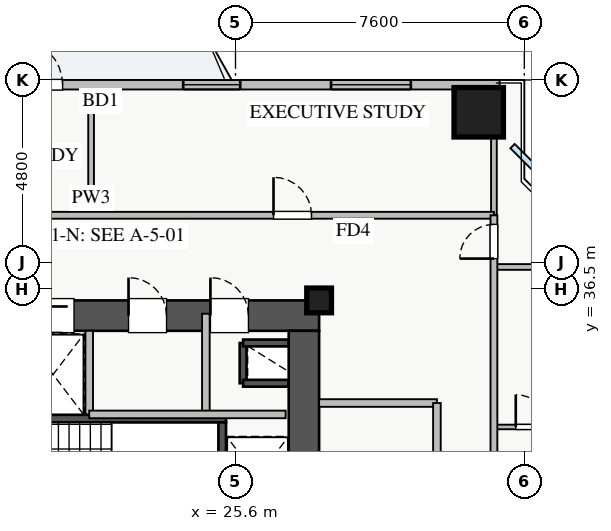
"""IFC4 building model, lengths in metres.
Left out: names, types, materials, properties, quantities, classifications, styles, units other than length and angle.
Written with IfcOpenShell. Run it as: python <this file> out.ifc"""

import sys

from ifc_helpers import new_model, si_unit, direction, frame, frame_2d, origin, origin_2d, place, context, subcontext, project, spatial, rectangle, extrude, source, transform, mapped, element, fill, save


model = new_model("IFC4")
c1 = context("Model", 3, precision=1e-05, world=origin(), true_north=direction((0.0, 1.0)))
c2 = subcontext(c1, "Body", "Model", "MODEL_VIEW")
j1 = project(units=[si_unit("LENGTHUNIT", "METRE"), si_unit("PLANEANGLEUNIT", "RADIAN")], contexts=[c1])
p1 = place(None, origin())
s1 = spatial("IfcSite", under=j1, at=p1, CompositionType="ELEMENT")
p2 = place(p1, origin())
s2 = spatial("IfcBuilding", under=s1, at=p2, CompositionType="ELEMENT")
p3 = place(p2, frame((0.0, 0.0, 56.75)))
s3 = spatial("IfcBuildingStorey", under=s2, at=p3, CompositionType="ELEMENT", Elevation=56.75)
p4 = place(p3, frame((25.8, 34.02, 0.0), z_axis=(0.0, 0.0, 1.0), x_axis=(0.0, 1.0, 0.0)))
e1 = element("IfcWall", 1, at=p4, inside=s3, PredefinedType="SHEAR", context=c2, shape_type="SweptSolid", body=[
    extrude(rectangle(XDim=1.06, YDim=0.18, at=frame_2d((0.53, 0.0))), origin(), (0.0, 0.0, 1.0), 3.07),
])
for number, where, z_axis, x_axis in (
    (2, (25.8, 35.08, 0.0), (0.0, 0.0, 1.0), (1.0, 0.0, 0.0)),
    (3, (25.8, 34.02, 0.0), (0.0, 0.0, 1.0), (1.0, 0.0, 0.0)),
):
    element("IfcWall", number, at=place(p3, frame(where, z_axis=z_axis, x_axis=x_axis)), inside=s3, PredefinedType="SHEAR", context=c2, shape_type="SweptSolid", body=[
        extrude(rectangle(XDim=1.2, YDim=0.18, at=frame_2d((0.6, 0.0))), origin(), (0.0, 0.0, 1.0), 3.07),
    ])
p5 = place(p3, frame((19.88, 33.2, 0.0), z_axis=(0.0, 0.0, 1.0), x_axis=(1.0, 0.0, 0.0)))
e4 = element("IfcWall", 4, at=p5, inside=s3, PredefinedType="SHEAR", context=c2, shape_type="SweptSolid", body=[
    extrude(rectangle(XDim=1.87, YDim=0.18, at=frame_2d((0.935, 0.0))), origin(), (0.0, 0.0, 1.0), 3.07),
])
p6 = place(p3, frame((18.2, 33.09, 0.0), z_axis=(0.0, 0.0, 1.0), x_axis=(1.0, 0.0, 0.0)))
e5 = element("IfcWall", 5, at=p6, inside=s3, PredefinedType="SHEAR", context=c2, shape_type="SweptSolid", body=[
    extrude(rectangle(XDim=7.15, YDim=0.2, at=frame_2d((3.575, 0.0))), origin(), (0.0, 0.0, 1.0), 3.25),
])
p7 = place(p6, frame((0.35, 0.0, 0.0)))
e6 = element("IfcOpeningElement", 6, at=p7, cuts=e5, PredefinedType="OPENING", context=c2, shape_type="SweptSolid", body=[
    extrude(rectangle(XDim=1.1, YDim=2.05, at=frame_2d((0.55, 1.025))), frame((0.0, 0.11, 0.0), z_axis=(0.0, -1.0, 0.0), x_axis=(1.0, 0.0, 0.0)), (0.0, 0.0, 1.0), 0.22),
])
p8 = place(p3, frame((25.25, 30.05, 0.0), z_axis=(0.0, 0.0, 1.0), x_axis=(0.0, 1.0, 0.0)))
e7 = element("IfcWall", 7, at=p8, inside=s3, PredefinedType="SHEAR", context=c2, shape_type="SweptSolid", body=[
    extrude(rectangle(XDim=2.94, YDim=0.2, at=frame_2d((1.47, 0.0))), origin(), (0.0, 0.0, 1.0), 3.25),
])
p9 = place(p3, frame((10.2, 35.8, 0.0), z_axis=(0.0, 0.0, 1.0), x_axis=(1.0, 0.0, 0.0)))
e8 = element("IfcWall", 8, at=p9, inside=s3, PredefinedType="SHEAR", context=c2, shape_type="SweptSolid", body=[
    extrude(rectangle(XDim=17.6, YDim=0.8, at=frame_2d((8.8, 0.0))), origin(), (0.0, 0.0, 1.0), 3.25),
])
p10 = place(p9, frame((1.15, 0.0, 0.0)))
e9 = element("IfcOpeningElement", 9, at=p10, cuts=e8, PredefinedType="OPENING", context=c2, shape_type="SweptSolid", body=[
    extrude(rectangle(XDim=1.1, YDim=2.05, at=frame_2d((0.55, 1.025))), frame((0.0, 0.41, 0.0), z_axis=(0.0, -1.0, 0.0), x_axis=(1.0, 0.0, 0.0)), (0.0, 0.0, 1.0), 0.82),
])
p11 = place(p9, frame((8.3, 0.0, 0.0)))
e10 = element("IfcOpeningElement", 10, at=p11, cuts=e8, PredefinedType="OPENING", context=c2, shape_type="SweptSolid", body=[
    extrude(rectangle(XDim=1.1, YDim=2.05, at=frame_2d((0.55, 1.025))), frame((0.0, 0.41, 0.0), z_axis=(0.0, -1.0, 0.0), x_axis=(1.0, 0.0, 0.0)), (0.0, 0.0, 1.0), 0.82),
])
p12 = place(p9, frame((10.05, 0.0, 0.0)))
e11 = element("IfcOpeningElement", 11, at=p12, cuts=e8, PredefinedType="OPENING", context=c2, shape_type="SweptSolid", body=[
    extrude(rectangle(XDim=1.1, YDim=2.05, at=frame_2d((0.55, 1.025))), frame((0.0, 0.41, 0.0), z_axis=(0.0, -1.0, 0.0), x_axis=(1.0, 0.0, 0.0)), (0.0, 0.0, 1.0), 0.82),
])
p13 = place(p9, frame((14.74, 0.0, 0.0)))
e12 = element("IfcOpeningElement", 12, at=p13, cuts=e8, PredefinedType="OPENING", context=c2, shape_type="SweptSolid", body=[
    extrude(rectangle(XDim=1.0, YDim=2.05, at=frame_2d((0.5, 1.025))), frame((0.0, 0.41, 0.0), z_axis=(0.0, -1.0, 0.0), x_axis=(1.0, 0.0, 0.0)), (0.0, 0.0, 1.0), 0.82),
])
p14 = place(p9, frame((12.585, 0.0, 0.0)))
e13 = element("IfcOpeningElement", 13, at=p14, cuts=e8, PredefinedType="OPENING", context=c2, shape_type="SweptSolid", body=[
    extrude(rectangle(XDim=1.0, YDim=2.05, at=frame_2d((0.5, 1.025))), frame((0.0, 0.41, 0.0), z_axis=(0.0, -1.0, 0.0), x_axis=(1.0, 0.0, 0.0)), (0.0, 0.0, 1.0), 0.82),
])
p15 = place(p3, frame((27.4, 29.8, 0.0), z_axis=(0.0, 0.0, 1.0), x_axis=(0.0, 1.0, 0.0)))
e14 = element("IfcWall", 14, at=p15, inside=s3, PredefinedType="SHEAR", context=c2, shape_type="SweptSolid", body=[
    extrude(rectangle(XDim=5.6, YDim=0.8, at=frame_2d((2.8, 0.0))), origin(), (0.0, 0.0, 1.0), 3.25),
])
p16 = place(p15, frame((1.1, 0.0, 0.0)))
e15 = element("IfcOpeningElement", 15, at=p16, cuts=e14, PredefinedType="OPENING", context=c2, shape_type="SweptSolid", body=[
    extrude(rectangle(XDim=1.3, YDim=2.05, at=frame_2d((0.65, 1.025))), frame((0.0, 0.41, 0.0), z_axis=(0.0, -1.0, 0.0), x_axis=(1.0, 0.0, 0.0)), (0.0, 0.0, 1.0), 0.82),
])
m1 = source(origin(), c2, "Body", "SweptSolid", [
    extrude(rectangle(XDim=0.65, YDim=0.65, at=origin_2d()), origin(), (0.0, 0.0, 1.0), 3.25),
])
p17 = place(p3, frame((27.8, 36.2, 0.0), z_axis=(0.0, 0.0, 1.0), x_axis=(1.0, 0.0, 0.0)))
e16 = element("IfcColumn", 16, at=p17, inside=s3, PredefinedType="PILASTER", context=c2, shape_type="MappedRepresentation", body=[
    mapped(m1, transform((0.0, 0.0, 0.0), x_axis=(1.0, 0.0, 0.0), y_axis=(0.0, 1.0, 0.0), z_axis=(0.0, 0.0, 1.0), scale=1.0)),
])
m2 = source(origin(), c2, "Body", "SweptSolid", [
    extrude(rectangle(XDim=1.3, YDim=1.3, at=origin_2d()), origin(), (0.0, 0.0, 1.0), 3.25),
])
p18 = place(p3, frame((32.0, 41.15, 0.0), z_axis=(0.0, 0.0, 1.0), x_axis=(1.0, 0.0, 0.0)))
e17 = element("IfcColumn", 17, at=p18, inside=s3, PredefinedType="COLUMN", context=c2, shape_type="MappedRepresentation", body=[
    mapped(m2, transform((0.0, 0.0, 0.0), x_axis=(1.0, 0.0, 0.0), y_axis=(0.0, 1.0, 0.0), z_axis=(0.0, 0.0, 1.0), scale=1.0)),
])
p19 = place(p3, frame((5.45, 41.875, 0.0), z_axis=(0.0, 0.0, 1.0), x_axis=(1.0, 0.0, 0.0)))
e18 = element("IfcWall", 18, at=p19, inside=s3, PredefinedType="STANDARD", context=c2, shape_type="SweptSolid", body=[
    extrude(rectangle(XDim=27.1, YDim=0.25, at=frame_2d((13.55, 0.0))), origin(), (0.0, 0.0, 1.0), 2.61),
])
p20 = place(p19, frame((14.4, 0.0, 0.0)))
e19 = element("IfcOpeningElement", 19, at=p20, cuts=e18, PredefinedType="OPENING", context=c2, shape_type="SweptSolid", body=[
    extrude(rectangle(XDim=1.2, YDim=2.1, at=frame_2d((0.6, 1.05))), frame((0.0, 0.135, 0.0), z_axis=(0.0, -1.0, 0.0), x_axis=(1.0, 0.0, 0.0)), (0.0, 0.0, 1.0), 0.27),
])
p21 = place(p19, frame((1.5, 0.0, 0.9)))
e20 = element("IfcOpeningElement", 20, at=p21, cuts=e18, PredefinedType="OPENING", context=c2, shape_type="SweptSolid", body=[
    extrude(rectangle(XDim=1.5, YDim=1.5, at=frame_2d((0.75, 0.75))), frame((0.0, 0.135, 0.0), z_axis=(0.0, -1.0, 0.0), x_axis=(1.0, 0.0, 0.0)), (0.0, 0.0, 1.0), 0.27),
])
p22 = place(p19, frame((9.263, 0.0, 0.9)))
e21 = element("IfcOpeningElement", 21, at=p22, cuts=e18, PredefinedType="OPENING", context=c2, shape_type="SweptSolid", body=[
    extrude(rectangle(XDim=1.8, YDim=1.45, at=frame_2d((0.9, 0.725))), frame((0.0, 0.135, 0.0), z_axis=(0.0, -1.0, 0.0), x_axis=(1.0, 0.0, 0.0)), (0.0, 0.0, 1.0), 0.27),
])
p23 = place(p19, frame((18.774, 0.0, 0.9)))
e22 = element("IfcOpeningElement", 22, at=p23, cuts=e18, PredefinedType="OPENING", context=c2, shape_type="SweptSolid", body=[
    extrude(rectangle(XDim=1.5, YDim=1.5, at=frame_2d((0.75, 0.75))), frame((0.0, 0.135, 0.0), z_axis=(0.0, -1.0, 0.0), x_axis=(1.0, 0.0, 0.0)), (0.0, 0.0, 1.0), 0.27),
])
p24 = place(p19, frame((22.663, 0.0, 0.9)))
e23 = element("IfcOpeningElement", 23, at=p24, cuts=e18, PredefinedType="OPENING", context=c2, shape_type="SweptSolid", body=[
    extrude(rectangle(XDim=2.1, YDim=1.48, at=frame_2d((1.05, 0.74))), frame((0.0, 0.135, 0.0), z_axis=(0.0, -1.0, 0.0), x_axis=(1.0, 0.0, 0.0)), (0.0, 0.0, 1.0), 0.27),
])
p25 = place(p19, frame((5.134, 0.0, 0.9)))
e24 = element("IfcOpeningElement", 24, at=p25, cuts=e18, PredefinedType="OPENING", context=c2, shape_type="SweptSolid", body=[
    extrude(rectangle(XDim=2.4, YDim=1.5, at=frame_2d((1.2, 0.75))), frame((0.0, 0.135, 0.0), z_axis=(0.0, -1.0, 0.0), x_axis=(1.0, 0.0, 0.0)), (0.0, 0.0, 1.0), 0.27),
])
p26 = place(p3, frame((27.8, 33.5, 0.0), z_axis=(0.0, 0.0, 1.0), x_axis=(1.0, 0.0, 0.0)))
e25 = element("IfcWall", 25, at=p26, inside=s3, PredefinedType="PARTITIONING", context=c2, shape_type="SweptSolid", body=[
    extrude(rectangle(XDim=3.1, YDim=0.2, at=frame_2d((1.55, 0.0))), origin(), (0.0, 0.0, 1.0), 3.07),
])
p27 = place(p3, frame((30.9, 29.6, 0.0), z_axis=(0.0, 0.0, 1.0), x_axis=(0.0, 1.0, 0.0)))
e26 = element("IfcWall", 26, at=p27, inside=s3, PredefinedType="PARTITIONING", context=c2, shape_type="SweptSolid", body=[
    extrude(rectangle(XDim=3.9, YDim=0.2, at=frame_2d((1.95, 0.0))), origin(), (0.0, 0.0, 1.0), 3.07),
])
p28 = place(p27, frame((1.4, 0.0, 0.0)))
e27 = element("IfcOpeningElement", 27, at=p28, cuts=e26, PredefinedType="OPENING", context=c2, shape_type="SweptSolid", body=[
    extrude(rectangle(XDim=1.1, YDim=2.05, at=frame_2d((0.55, 1.025))), frame((0.0, 0.11, 0.0), z_axis=(0.0, -1.0, 0.0), x_axis=(1.0, 0.0, 0.0)), (0.0, 0.0, 1.0), 0.22),
])
p29 = place(p3, frame((24.82, 33.2, 0.0), z_axis=(0.0, 0.0, 1.0), x_axis=(0.0, 1.0, 0.0)))
e28 = element("IfcWall", 28, at=p29, inside=s3, PredefinedType="PARTITIONING", context=c2, shape_type="SweptSolid", body=[
    extrude(rectangle(XDim=2.65, YDim=0.2, at=frame_2d((1.325, 0.0))), origin(), (0.0, 0.0, 1.0), 3.07),
])
p30 = place(p3, frame((21.75, 33.2, 0.0), z_axis=(0.0, 0.0, 1.0), x_axis=(0.0, 1.0, 0.0)))
e29 = element("IfcWall", 29, at=p30, inside=s3, PredefinedType="PARTITIONING", context=c2, shape_type="SweptSolid", body=[
    extrude(rectangle(XDim=2.2, YDim=0.2, at=frame_2d((1.1, 0.0))), origin(), (0.0, 0.0, 1.0), 3.07),
])
p31 = place(p3, frame((21.75, 33.2, 0.0), z_axis=(0.0, 0.0, 1.0), x_axis=(1.0, 0.0, 0.0)))
e30 = element("IfcWall", 30, at=p31, inside=s3, PredefinedType="PARTITIONING", context=c2, shape_type="SweptSolid", body=[
    extrude(rectangle(XDim=5.17, YDim=0.2, at=frame_2d((2.585, 0.0))), origin(), (0.0, 0.0, 1.0), 3.07),
])
for number, where, z_axis, x_axis in (
    (31, (21.8, 38.44, 0.0), (0.0, 0.0, 1.0), (0.0, 1.0, 0.0)),
    (32, (32.4, 38.44, 0.0), (0.0, 0.0, 1.0), (0.0, 1.0, 0.0)),
):
    element("IfcWall", number, at=place(p3, frame(where, z_axis=z_axis, x_axis=x_axis)), inside=s3, PredefinedType="PARTITIONING", context=c2, shape_type="SweptSolid", body=[
        extrude(rectangle(XDim=3.31, YDim=0.15, at=frame_2d((1.655, 0.0))), origin(), (0.0, 0.0, 1.0), 3.07),
    ])
p32 = place(p3, frame((8.82, 38.44, 0.0), z_axis=(0.0, 0.0, 1.0), x_axis=(1.0, 0.0, 0.0)))
e33 = element("IfcWall", 33, at=p32, inside=s3, PredefinedType="PARTITIONING", context=c2, shape_type="SweptSolid", body=[
    extrude(rectangle(XDim=23.58, YDim=0.18, at=frame_2d((11.79, 0.0))), origin(), (0.0, 0.0, 1.0), 3.07),
])
p33 = place(p32, frame((5.99, 0.0, 0.0)))
e34 = element("IfcOpeningElement", 34, at=p33, cuts=e33, PredefinedType="OPENING", context=c2, shape_type="SweptSolid", body=[
    extrude(rectangle(XDim=1.0, YDim=2.05, at=frame_2d((0.5, 1.025))), frame((0.0, 0.1, 0.0), z_axis=(0.0, -1.0, 0.0), x_axis=(1.0, 0.0, 0.0)), (0.0, 0.0, 1.0), 0.2),
])
p34 = place(p32, frame((17.78, 0.0, 0.0)))
e35 = element("IfcOpeningElement", 35, at=p34, cuts=e33, PredefinedType="OPENING", context=c2, shape_type="SweptSolid", body=[
    extrude(rectangle(XDim=1.0, YDim=2.05, at=frame_2d((0.5, 1.025))), frame((0.0, 0.1, 0.0), z_axis=(0.0, -1.0, 0.0), x_axis=(1.0, 0.0, 0.0)), (0.0, 0.0, 1.0), 0.2),
])
p35 = place(p3, frame((32.4, 37.08, 0.0), z_axis=(0.0, 0.0, 1.0), x_axis=(1.0, 0.0, 0.0)))
e36 = element("IfcWall", 36, at=p35, inside=s3, PredefinedType="PARTITIONING", context=c2, shape_type="SweptSolid", body=[
    extrude(rectangle(XDim=5.35, YDim=0.15, at=frame_2d((2.675, 0.0))), origin(), (0.0, 0.0, 1.0), 3.07),
])
p36 = place(p3, frame((32.4, 32.87, 0.0), z_axis=(0.0, 0.0, 1.0), x_axis=(1.0, 0.0, 0.0)))
e37 = element("IfcWall", 37, at=p36, inside=s3, PredefinedType="PLUMBINGWALL", context=c2, shape_type="SweptSolid", body=[
    extrude(rectangle(XDim=5.35, YDim=0.12, at=frame_2d((2.675, 0.0))), origin(), (0.0, 0.0, 1.0), 3.07),
])
p37 = place(p36, frame((0.575, 0.0, 0.0)))
e38 = element("IfcOpeningElement", 38, at=p37, cuts=e37, PredefinedType="OPENING", context=c2, shape_type="SweptSolid", body=[
    extrude(rectangle(XDim=0.85, YDim=2.05, at=frame_2d((0.425, 1.025))), frame((0.0, 0.07, 0.0), z_axis=(0.0, -1.0, 0.0), x_axis=(1.0, 0.0, 0.0)), (0.0, 0.0, 1.0), 0.14),
])
p38 = place(p36, frame((3.205, 0.0, 0.0)))
e39 = element("IfcOpeningElement", 39, at=p38, cuts=e37, PredefinedType="OPENING", context=c2, shape_type="SweptSolid", body=[
    extrude(rectangle(XDim=0.9, YDim=2.05, at=frame_2d((0.45, 1.025))), frame((0.0, 0.07, 0.0), z_axis=(0.0, -1.0, 0.0), x_axis=(1.0, 0.0, 0.0)), (0.0, 0.0, 1.0), 0.14),
])
p39 = place(p3, frame((32.4, 7.21, 0.0), z_axis=(0.0, 0.0, 1.0), x_axis=(0.0, 1.0, 0.0)))
e40 = element("IfcWall", 40, at=p39, inside=s3, PredefinedType="PARTITIONING", context=c2, shape_type="SweptSolid", body=[
    extrude(rectangle(XDim=31.23, YDim=0.18, at=frame_2d((15.615, 0.0))), origin(), (0.0, 0.0, 1.0), 2.815),
])
p40 = place(p39, frame((30.09, 0.0, 0.0)))
e41 = element("IfcOpeningElement", 41, at=p40, cuts=e40, PredefinedType="OPENING", context=c2, shape_type="SweptSolid", body=[
    extrude(rectangle(XDim=0.9, YDim=2.05, at=frame_2d((0.45, 1.025))), frame((0.0, 0.1, 0.0), z_axis=(0.0, -1.0, 0.0), x_axis=(1.0, 0.0, 0.0)), (0.0, 0.0, 1.0), 0.2),
])
p41 = place(p39, frame((0.415, 0.0, 0.0)))
e42 = element("IfcOpeningElement", 42, at=p41, cuts=e40, PredefinedType="OPENING", context=c2, shape_type="SweptSolid", body=[
    extrude(rectangle(XDim=0.9, YDim=2.05, at=frame_2d((0.45, 1.025))), frame((0.0, 0.1, 0.0), z_axis=(0.0, -1.0, 0.0), x_axis=(1.0, 0.0, 0.0)), (0.0, 0.0, 1.0), 0.2),
])
p42 = place(p39, frame((3.585, 0.0, 0.0)))
e43 = element("IfcOpeningElement", 43, at=p42, cuts=e40, PredefinedType="OPENING", context=c2, shape_type="SweptSolid", body=[
    extrude(rectangle(XDim=1.0, YDim=2.05, at=frame_2d((0.5, 1.025))), frame((0.0, 0.1, 0.0), z_axis=(0.0, -1.0, 0.0), x_axis=(1.0, 0.0, 0.0)), (0.0, 0.0, 1.0), 0.2),
])
p43 = place(p39, frame((12.86, 0.0, 0.0)))
e44 = element("IfcOpeningElement", 44, at=p43, cuts=e40, PredefinedType="OPENING", context=c2, shape_type="SweptSolid", body=[
    extrude(rectangle(XDim=1.0, YDim=2.05, at=frame_2d((0.5, 1.025))), frame((0.0, 0.1, 0.0), z_axis=(0.0, -1.0, 0.0), x_axis=(1.0, 0.0, 0.0)), (0.0, 0.0, 1.0), 0.2),
])
p44 = place(p39, frame((22.5, 0.0, 0.0)))
e45 = element("IfcOpeningElement", 45, at=p44, cuts=e40, PredefinedType="OPENING", context=c2, shape_type="SweptSolid", body=[
    extrude(rectangle(XDim=1.0, YDim=2.05, at=frame_2d((0.5, 1.025))), frame((0.0, 0.1, 0.0), z_axis=(0.0, -1.0, 0.0), x_axis=(1.0, 0.0, 0.0)), (0.0, 0.0, 1.0), 0.2),
])
m3 = source(origin(), c2, "Body", "SweptSolid", [
    extrude(rectangle(XDim=1.2, YDim=2.1, at=frame_2d((0.6, 1.05))), frame((0.0, 0.025, 0.0), z_axis=(0.0, -1.0, 0.0), x_axis=(1.0, 0.0, 0.0)), (0.0, 0.0, 1.0), 0.05),
])
p45 = place(p20, origin())
e46 = element("IfcDoor", 46, at=p45, inside=s3, OperationType="SINGLE_SWING_LEFT", PredefinedType="DOOR", context=c2, shape_type="MappedRepresentation", body=[
    mapped(m3, transform((0.0, 0.0, 0.0), x_axis=(1.0, 0.0, 0.0), y_axis=(0.0, 1.0, 0.0), z_axis=(0.0, 0.0, 1.0), scale=1.0)),
])
fill(e19, e46)
m4 = source(origin(), c2, "Body", "SweptSolid", [
    extrude(rectangle(XDim=1.5, YDim=1.5, at=frame_2d((0.75, 0.75))), frame((0.0, 0.03, 0.0), z_axis=(0.0, -1.0, 0.0), x_axis=(1.0, 0.0, 0.0)), (0.0, 0.0, 1.0), 0.06),
])
p46 = place(p23, origin())
e47 = element("IfcWindow", 47, at=p46, inside=s3, PartitioningType="DOUBLE_PANEL_VERTICAL", PredefinedType="WINDOW", context=c2, shape_type="MappedRepresentation", body=[
    mapped(m4, transform((0.0, 0.0, 0.0), x_axis=(1.0, 0.0, 0.0), y_axis=(0.0, 1.0, 0.0), z_axis=(0.0, 0.0, 1.0), scale=1.0)),
])
fill(e22, e47)
m5 = source(origin(), c2, "Body", "SweptSolid", [
    extrude(rectangle(XDim=2.1, YDim=1.48, at=frame_2d((1.05, 0.74))), frame((0.0, 0.03, 0.0), z_axis=(0.0, -1.0, 0.0), x_axis=(1.0, 0.0, 0.0)), (0.0, 0.0, 1.0), 0.06),
])
p47 = place(p24, origin())
e48 = element("IfcWindow", 48, at=p47, inside=s3, PartitioningType="TRIPLE_PANEL_VERTICAL", PredefinedType="WINDOW", context=c2, shape_type="MappedRepresentation", body=[
    mapped(m5, transform((0.0, 0.0, 0.0), x_axis=(1.0, 0.0, 0.0), y_axis=(0.0, 1.0, 0.0), z_axis=(0.0, 0.0, 1.0), scale=1.0)),
])
fill(e23, e48)
m6 = source(origin(), c2, "Body", "SweptSolid", [
    extrude(rectangle(XDim=1.1, YDim=2.05, at=frame_2d((0.55, 1.025))), frame((0.0, 0.025, 0.0), z_axis=(0.0, -1.0, 0.0), x_axis=(1.0, 0.0, 0.0)), (0.0, 0.0, 1.0), 0.05),
])
p48 = place(p12, origin())
e49 = element("IfcDoor", 49, at=p48, inside=s3, OperationType="SLIDING_TO_LEFT", PredefinedType="DOOR", context=c2, shape_type="MappedRepresentation", body=[
    mapped(m6, transform((0.0, 0.0, 0.0), x_axis=(1.0, 0.0, 0.0), y_axis=(0.0, 1.0, 0.0), z_axis=(0.0, 0.0, 1.0), scale=1.0)),
])
fill(e11, e49)
m7 = source(origin(), c2, "Body", "SweptSolid", [
    extrude(rectangle(XDim=1.0, YDim=2.05, at=frame_2d((0.5, 1.025))), frame((0.0, 0.025, 0.0), z_axis=(0.0, -1.0, 0.0), x_axis=(1.0, 0.0, 0.0)), (0.0, 0.0, 1.0), 0.05),
])
p49 = place(p13, origin())
e50 = element("IfcDoor", 50, at=p49, inside=s3, OperationType="SINGLE_SWING_LEFT", PredefinedType="DOOR", context=c2, shape_type="MappedRepresentation", body=[
    mapped(m7, transform((0.0, 0.0, 0.0), x_axis=(1.0, 0.0, 0.0), y_axis=(0.0, 1.0, 0.0), z_axis=(0.0, 0.0, 1.0), scale=1.0)),
])
fill(e12, e50)
p50 = place(p14, origin())
e51 = element("IfcDoor", 51, at=p50, inside=s3, OperationType="SINGLE_SWING_LEFT", PredefinedType="DOOR", context=c2, shape_type="MappedRepresentation", body=[
    mapped(m7, transform((0.0, 0.0, 0.0), x_axis=(1.0, 0.0, 0.0), y_axis=(0.0, 1.0, 0.0), z_axis=(0.0, 0.0, 1.0), scale=1.0)),
])
fill(e13, e51)
p51 = place(p34, origin())
e52 = element("IfcDoor", 52, at=p51, inside=s3, OperationType="SINGLE_SWING_LEFT", PredefinedType="DOOR", context=c2, shape_type="MappedRepresentation", body=[
    mapped(m7, transform((0.0, 0.0, 0.0), x_axis=(1.0, 0.0, 0.0), y_axis=(0.0, 1.0, 0.0), z_axis=(0.0, 0.0, 1.0), scale=1.0)),
])
fill(e35, e52)
m8 = source(origin(), c2, "Body", "SweptSolid", [
    extrude(rectangle(XDim=0.85, YDim=2.05, at=frame_2d((0.425, 1.025))), frame((0.0, 0.025, 0.0), z_axis=(0.0, -1.0, 0.0), x_axis=(1.0, 0.0, 0.0)), (0.0, 0.0, 1.0), 0.05),
])
p52 = place(p37, origin())
e53 = element("IfcDoor", 53, at=p52, inside=s3, OperationType="SINGLE_SWING_LEFT", PredefinedType="DOOR", context=c2, shape_type="MappedRepresentation", body=[
    mapped(m8, transform((0.0, 0.0, 0.0), x_axis=(1.0, 0.0, 0.0), y_axis=(0.0, 1.0, 0.0), z_axis=(0.0, 0.0, 1.0), scale=1.0)),
])
fill(e38, e53)
m9 = source(origin(), c2, "Body", "SweptSolid", [
    extrude(rectangle(XDim=0.9, YDim=2.05, at=frame_2d((0.45, 1.025))), frame((0.0, 0.025, 0.0), z_axis=(0.0, -1.0, 0.0), x_axis=(1.0, 0.0, 0.0)), (0.0, 0.0, 1.0), 0.05),
])
p53 = place(p40, origin())
e54 = element("IfcDoor", 54, at=p53, inside=s3, OperationType="SINGLE_SWING_LEFT", PredefinedType="DOOR", context=c2, shape_type="MappedRepresentation", body=[
    mapped(m9, transform((0.0, 0.0, 0.0), x_axis=(1.0, 0.0, 0.0), y_axis=(0.0, 1.0, 0.0), z_axis=(0.0, 0.0, 1.0), scale=1.0)),
])
fill(e41, e54)
save(model, sys.argv[1])
